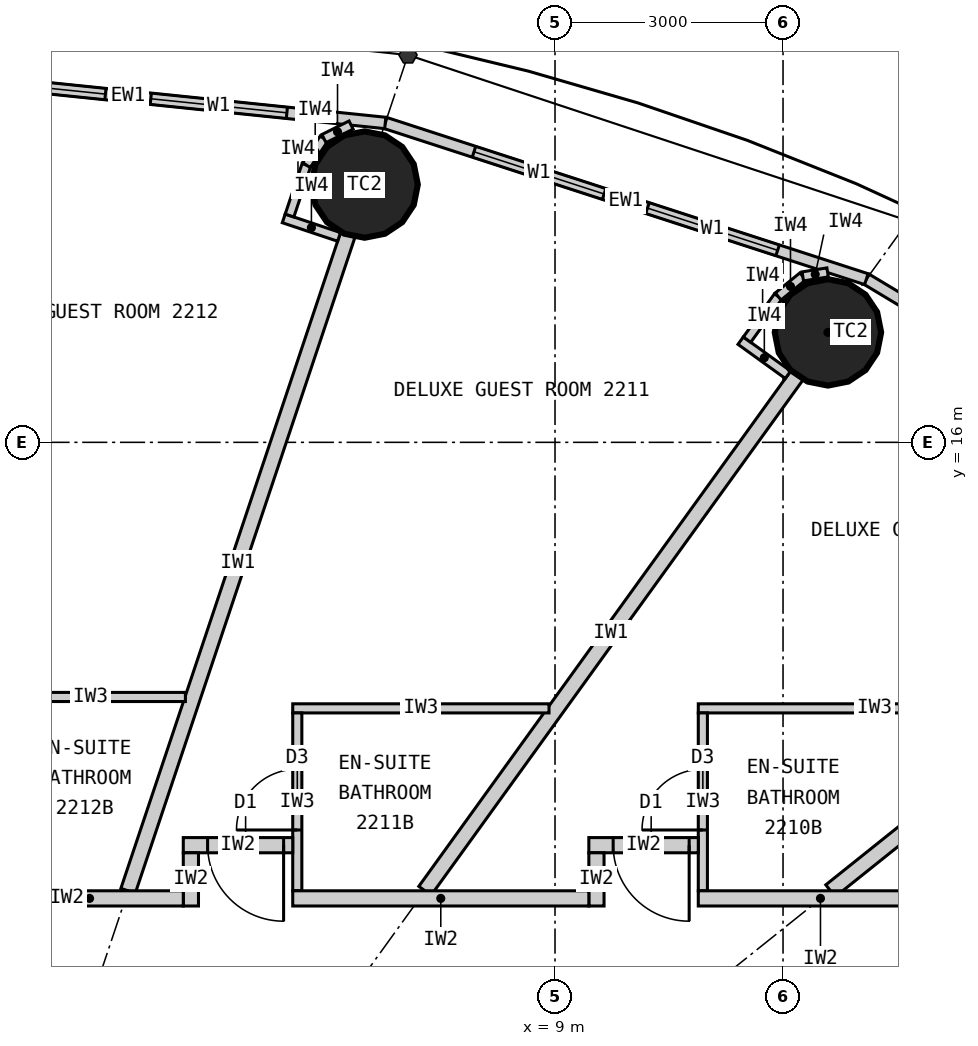
"""IFC4 building model, lengths in metres.
Left out: names, types, materials, properties, quantities, classifications, styles, units other than length and angle.
Written with IfcOpenShell. Run it as: python <this file> out.ifc"""

import sys

from ifc_helpers import new_model, si_unit, direction, frame, frame_2d, origin, origin_2d, place, context, subcontext, project, spatial, rectangle, circle, extrude, element, fill, save


model = new_model("IFC4")
c1 = context("Model", 3, precision=1e-05, world=origin(), true_north=direction((0.0, 1.0)))
c2 = subcontext(c1, "Body", "Model", "MODEL_VIEW")
j1 = project(units=[si_unit("LENGTHUNIT", "METRE"), si_unit("PLANEANGLEUNIT", "RADIAN")], contexts=[c1])
p1 = place(None, origin())
s1 = spatial("IfcSite", under=j1, at=p1, CompositionType="ELEMENT")
p2 = place(p1, origin())
s2 = spatial("IfcBuilding", under=s1, at=p2, CompositionType="ELEMENT")
p3 = place(p2, frame((0.0, 0.0, 87.0)))
s3 = spatial("IfcBuildingStorey", under=s2, at=p3, CompositionType="ELEMENT", Elevation=87.0)
for number, where, z_axis, x_axis in (
    (1, (12.591, 17.447, 0.0), (0.0, 0.0, 1.0), (1.0, 0.0, 0.0)),
    (2, (6.495, 19.391, 0.0), (0.0, 0.0, 1.0), (1.0, 0.0, 0.0)),
):
    element("IfcColumn", number, at=place(p3, frame(where, z_axis=z_axis, x_axis=x_axis)), inside=s3, PredefinedType="COLUMN", context=c2, shape_type="SweptSolid", body=[
        extrude(circle(Radius=0.7, at=origin_2d()), origin(), (0.0, 0.0, 1.0), 3.3),
    ])
p4 = place(p3, frame((18.57, 14.856, 0.0), z_axis=(0.0, 0.0, 1.0), x_axis=(-0.856983180864, 0.515344377787, 0.0)))
e3 = element("IfcWall", 3, at=p4, inside=s3, PredefinedType="ELEMENTEDWALL", context=c2, shape_type="SweptSolid", body=[
    extrude(rectangle(XDim=6.386, YDim=0.15, at=frame_2d((3.193, 0.0))), origin(), (0.0, 0.0, 1.0), 3.12),
])
p5 = place(p4, frame((1.093, 0.0, 0.9)))
e4 = element("IfcOpeningElement", 4, at=p5, cuts=e3, PredefinedType="OPENING", context=c2, shape_type="SweptSolid", body=[
    extrude(rectangle(XDim=1.8, YDim=1.9, at=frame_2d((0.9, 0.95))), frame((0.0, 0.085, 0.0), z_axis=(0.0, -1.0, 0.0), x_axis=(1.0, 0.0, 0.0)), (0.0, 0.0, 1.0), 0.17),
])
p6 = place(p4, frame((3.493, 0.0, 0.9)))
e5 = element("IfcOpeningElement", 5, at=p6, cuts=e3, PredefinedType="OPENING", context=c2, shape_type="SweptSolid", body=[
    extrude(rectangle(XDim=1.8, YDim=1.9, at=frame_2d((0.9, 0.95))), frame((0.0, 0.085, 0.0), z_axis=(0.0, -1.0, 0.0), x_axis=(1.0, 0.0, 0.0)), (0.0, 0.0, 1.0), 0.17),
])
p7 = place(p3, frame((13.096, 18.147, 0.0), z_axis=(0.0, 0.0, 1.0), x_axis=(-0.951137534625, 0.308767534285, 0.0)))
e6 = element("IfcWall", 6, at=p7, inside=s3, PredefinedType="ELEMENTEDWALL", context=c2, shape_type="SweptSolid", body=[
    extrude(rectangle(XDim=6.655, YDim=0.15, at=frame_2d((3.328, 0.0))), origin(), (0.0, 0.0, 1.0), 3.12),
])
p8 = place(p7, frame((1.228, 0.0, 0.9)))
e7 = element("IfcOpeningElement", 7, at=p8, cuts=e6, PredefinedType="OPENING", context=c2, shape_type="SweptSolid", body=[
    extrude(rectangle(XDim=1.8, YDim=1.9, at=frame_2d((0.9, 0.95))), frame((0.0, 0.085, 0.0), z_axis=(0.0, -1.0, 0.0), x_axis=(1.0, 0.0, 0.0)), (0.0, 0.0, 1.0), 0.17),
])
p9 = place(p7, frame((3.628, 0.0, 0.9)))
e8 = element("IfcOpeningElement", 8, at=p9, cuts=e6, PredefinedType="OPENING", context=c2, shape_type="SweptSolid", body=[
    extrude(rectangle(XDim=1.8, YDim=1.9, at=frame_2d((0.9, 0.95))), frame((0.0, 0.085, 0.0), z_axis=(0.0, -1.0, 0.0), x_axis=(1.0, 0.0, 0.0)), (0.0, 0.0, 1.0), 0.17),
])
p10 = place(p3, frame((6.766, 20.202, 0.0), z_axis=(0.0, 0.0, 1.0), x_axis=(-0.994721394369, 0.102612609291, 0.0)))
e9 = element("IfcWall", 9, at=p10, inside=s3, PredefinedType="ELEMENTEDWALL", context=c2, shape_type="SweptSolid", body=[
    extrude(rectangle(XDim=6.802, YDim=0.15, at=frame_2d((3.401, 0.0))), origin(), (0.0, 0.0, 1.0), 3.12),
])
p11 = place(p10, frame((1.301, 0.0, 0.9)))
e10 = element("IfcOpeningElement", 10, at=p11, cuts=e9, PredefinedType="OPENING", context=c2, shape_type="SweptSolid", body=[
    extrude(rectangle(XDim=1.8, YDim=1.9, at=frame_2d((0.9, 0.95))), frame((0.0, 0.085, 0.0), z_axis=(0.0, -1.0, 0.0), x_axis=(1.0, 0.0, 0.0)), (0.0, 0.0, 1.0), 0.17),
])
p12 = place(p10, frame((3.701, 0.0, 0.9)))
e11 = element("IfcOpeningElement", 11, at=p12, cuts=e9, PredefinedType="OPENING", context=c2, shape_type="SweptSolid", body=[
    extrude(rectangle(XDim=1.8, YDim=1.9, at=frame_2d((0.9, 0.95))), frame((0.0, 0.085, 0.0), z_axis=(0.0, -1.0, 0.0), x_axis=(1.0, 0.0, 0.0)), (0.0, 0.0, 1.0), 0.17),
])
p13 = place(p3, frame((12.625, 10.1, 0.0), z_axis=(0.0, 0.0, 1.0), x_axis=(0.780892451574, 0.624665493744, 0.0)))
e12 = element("IfcWall", 12, at=p13, inside=s3, PredefinedType="PARTITIONING", context=c2, shape_type="SweptSolid", body=[
    extrude(rectangle(XDim=6.045, YDim=0.2, at=frame_2d((3.022, 0.0))), origin(), (0.0, 0.0, 1.0), 2.27),
])
p14 = place(p3, frame((7.289, 10.1, 0.0), z_axis=(0.0, 0.0, 1.0), x_axis=(0.585198353053, 0.810890182197, 0.0)))
e13 = element("IfcWall", 13, at=p14, inside=s3, PredefinedType="PARTITIONING", context=c2, shape_type="SweptSolid", body=[
    extrude(rectangle(XDim=8.36, YDim=0.2, at=frame_2d((4.18, 0.0))), origin(), (0.0, 0.0, 1.0), 2.27),
])
p15 = place(p3, frame((3.383, 10.1, 0.0), z_axis=(0.0, 0.0, 1.0), x_axis=(0.31759592231, 0.948226149256, 0.0)))
e14 = element("IfcWall", 14, at=p15, inside=s3, PredefinedType="PARTITIONING", context=c2, shape_type="SweptSolid", body=[
    extrude(rectangle(XDim=9.098, YDim=0.2, at=frame_2d((4.549, 0.0))), origin(), (0.0, 0.0, 1.0), 2.27),
])
p16 = place(p3, frame((15.525, 12.5, 0.0), z_axis=(0.0, 0.0, 1.0), x_axis=(-1.0, 0.0, 0.0)))
e15 = element("IfcWall", 15, at=p16, inside=s3, PredefinedType="PARTITIONING", context=c2, shape_type="SweptSolid", body=[
    extrude(rectangle(XDim=4.64, YDim=0.12, at=frame_2d((2.32, 0.0))), origin(), (0.0, 0.0, 1.0), 3.12),
])
p17 = place(p3, frame((10.945, 10.1, 0.0), z_axis=(0.0, 0.0, 1.0), x_axis=(0.0, 1.0, 0.0)))
e16 = element("IfcWall", 16, at=p17, inside=s3, PredefinedType="PARTITIONING", context=c2, shape_type="SweptSolid", body=[
    extrude(rectangle(XDim=2.34, YDim=0.12, at=frame_2d((1.17, 0.0))), origin(), (0.0, 0.0, 1.0), 3.12),
])
p18 = place(p17, frame((0.8, 0.0, 0.0)))
e17 = element("IfcOpeningElement", 17, at=p18, cuts=e16, PredefinedType="OPENING", context=c2, shape_type="SweptSolid", body=[
    extrude(rectangle(XDim=0.8, YDim=2.1, at=frame_2d((0.4, 1.05))), frame((0.0, 0.07, 0.0), z_axis=(0.0, -1.0, 0.0), x_axis=(1.0, 0.0, 0.0)), (0.0, 0.0, 1.0), 0.14),
])
p19 = place(p3, frame((8.921, 12.5, 0.0), z_axis=(0.0, 0.0, 1.0), x_axis=(-1.0, 0.0, 0.0)))
e18 = element("IfcWall", 18, at=p19, inside=s3, PredefinedType="PARTITIONING", context=c2, shape_type="SweptSolid", body=[
    extrude(rectangle(XDim=3.372, YDim=0.12, at=frame_2d((1.686, 0.0))), origin(), (0.0, 0.0, 1.0), 3.12),
])
p20 = place(p3, frame((5.609, 10.1, 0.0), z_axis=(0.0, 0.0, 1.0), x_axis=(0.0, 1.0, 0.0)))
e19 = element("IfcWall", 19, at=p20, inside=s3, PredefinedType="PARTITIONING", context=c2, shape_type="SweptSolid", body=[
    extrude(rectangle(XDim=2.34, YDim=0.12, at=frame_2d((1.17, 0.0))), origin(), (0.0, 0.0, 1.0), 3.12),
])
p21 = place(p20, frame((0.8, 0.0, 0.0)))
e20 = element("IfcOpeningElement", 20, at=p21, cuts=e19, PredefinedType="OPENING", context=c2, shape_type="SweptSolid", body=[
    extrude(rectangle(XDim=0.8, YDim=2.1, at=frame_2d((0.4, 1.05))), frame((0.0, 0.07, 0.0), z_axis=(0.0, -1.0, 0.0), x_axis=(1.0, 0.0, 0.0)), (0.0, 0.0, 1.0), 0.14),
])
p22 = place(p3, frame((4.137, 12.65, 0.0), z_axis=(0.0, 0.0, 1.0), x_axis=(-1.0, 0.0, 0.0)))
e21 = element("IfcWall", 21, at=p22, inside=s3, PredefinedType="PARTITIONING", context=c2, shape_type="SweptSolid", body=[
    extrude(rectangle(XDim=2.494, YDim=0.12, at=frame_2d((1.247, 0.0))), origin(), (0.0, 0.0, 1.0), 3.12),
])
p23 = place(p3, frame((9.445, 10.7, 0.0), z_axis=(0.0, 0.0, 1.0), x_axis=(1.0, 0.0, 0.0)))
e22 = element("IfcWall", 22, at=p23, inside=s3, PredefinedType="PARTITIONING", context=c2, shape_type="SweptSolid", body=[
    extrude(rectangle(XDim=1.44, YDim=0.2, at=frame_2d((0.72, 0.0))), origin(), (0.0, 0.0, 1.0), 3.12),
])
p24 = place(p23, frame((0.32, 0.0, 0.0)))
e23 = element("IfcOpeningElement", 23, at=p24, cuts=e22, PredefinedType="OPENING", context=c2, shape_type="SweptSolid", body=[
    extrude(rectangle(XDim=1.0, YDim=2.2, at=frame_2d((0.5, 1.1))), frame((0.0, 0.11, 0.0), z_axis=(0.0, -1.0, 0.0), x_axis=(1.0, 0.0, 0.0)), (0.0, 0.0, 1.0), 0.22),
])
p25 = place(p3, frame((9.545, 9.9, 0.0), z_axis=(0.0, 0.0, 1.0), x_axis=(0.0, 1.0, 0.0)))
e24 = element("IfcWall", 24, at=p25, inside=s3, PredefinedType="PARTITIONING", context=c2, shape_type="SweptSolid", body=[
    extrude(rectangle(XDim=0.7, YDim=0.2, at=frame_2d((0.35, 0.0))), origin(), (0.0, 0.0, 1.0), 3.12),
])
p26 = place(p3, frame((4.109, 10.7, 0.0), z_axis=(0.0, 0.0, 1.0), x_axis=(1.0, 0.0, 0.0)))
e25 = element("IfcWall", 25, at=p26, inside=s3, PredefinedType="PARTITIONING", context=c2, shape_type="SweptSolid", body=[
    extrude(rectangle(XDim=1.44, YDim=0.2, at=frame_2d((0.72, 0.0))), origin(), (0.0, 0.0, 1.0), 3.12),
])
p27 = place(p26, frame((0.32, 0.0, 0.0)))
e26 = element("IfcOpeningElement", 26, at=p27, cuts=e25, PredefinedType="OPENING", context=c2, shape_type="SweptSolid", body=[
    extrude(rectangle(XDim=1.0, YDim=2.2, at=frame_2d((0.5, 1.1))), frame((0.0, 0.11, 0.0), z_axis=(0.0, -1.0, 0.0), x_axis=(1.0, 0.0, 0.0)), (0.0, 0.0, 1.0), 0.22),
])
p28 = place(p3, frame((4.209, 9.9, 0.0), z_axis=(0.0, 0.0, 1.0), x_axis=(0.0, 1.0, 0.0)))
e27 = element("IfcWall", 27, at=p28, inside=s3, PredefinedType="PARTITIONING", context=c2, shape_type="SweptSolid", body=[
    extrude(rectangle(XDim=0.7, YDim=0.2, at=frame_2d((0.35, 0.0))), origin(), (0.0, 0.0, 1.0), 3.12),
])
p29 = place(p3, frame((1.643, 10.0, 0.0), z_axis=(0.0, 0.0, 1.0), x_axis=(1.0, 0.0, 0.0)))
e28 = element("IfcWall", 28, at=p29, inside=s3, PredefinedType="PARTITIONING", context=c2, shape_type="SweptSolid", body=[
    extrude(rectangle(XDim=2.466, YDim=0.2, at=frame_2d((1.233, 0.0))), origin(), (0.0, 0.0, 1.0), 3.12),
])
p30 = place(p3, frame((5.549, 10.0, 0.0), z_axis=(0.0, 0.0, 1.0), x_axis=(1.0, 0.0, 0.0)))
e29 = element("IfcWall", 29, at=p30, inside=s3, PredefinedType="PARTITIONING", context=c2, shape_type="SweptSolid", body=[
    extrude(rectangle(XDim=3.896, YDim=0.2, at=frame_2d((1.948, 0.0))), origin(), (0.0, 0.0, 1.0), 3.12),
])
p31 = place(p3, frame((10.885, 10.0, 0.0), z_axis=(0.0, 0.0, 1.0), x_axis=(1.0, 0.0, 0.0)))
e30 = element("IfcWall", 30, at=p31, inside=s3, PredefinedType="PARTITIONING", context=c2, shape_type="SweptSolid", body=[
    extrude(rectangle(XDim=3.215, YDim=0.2, at=frame_2d((1.607, 0.0))), origin(), (0.0, 0.0, 1.0), 3.12),
])
p32 = place(p3, frame((12.065, 16.889, 0.0), z_axis=(0.0, 0.0, 1.0), x_axis=(-0.810821798253, 0.585293098778, 0.0)))
e31 = element("IfcWall", 31, at=p32, inside=s3, PredefinedType="PARTITIONING", context=c2, shape_type="SweptSolid", body=[
    extrude(rectangle(XDim=0.768, YDim=0.12, at=frame_2d((0.384, 0.0))), origin(), (0.0, 0.0, 1.0), 3.12),
])
p33 = place(p3, frame((11.526, 17.351, 0.0), z_axis=(0.0, 0.0, 1.0), x_axis=(0.585223113993, 0.810872312296, 0.0)))
e32 = element("IfcWall", 32, at=p33, inside=s3, PredefinedType="PARTITIONING", context=c2, shape_type="SweptSolid", body=[
    extrude(rectangle(XDim=0.7, YDim=0.12, at=frame_2d((0.35, 0.0))), origin(), (0.0, 0.0, 1.0), 3.12),
])
p34 = place(p3, frame((11.936, 17.919, 0.0), z_axis=(0.0, 0.0, 1.0), x_axis=(0.775023088441, 0.631932917629, 0.0)))
e33 = element("IfcWall", 33, at=p34, inside=s3, PredefinedType="PARTITIONING", context=c2, shape_type="SweptSolid", body=[
    extrude(rectangle(XDim=0.418, YDim=0.12, at=frame_2d((0.209, 0.0))), origin(), (0.0, 0.0, 1.0), 3.12),
])
p35 = place(p3, frame((12.26, 18.183, 0.0), z_axis=(0.0, 0.0, 1.0), x_axis=(0.987218661664, 0.159371622511, 0.0)))
e34 = element("IfcWall", 34, at=p35, inside=s3, PredefinedType="PARTITIONING", context=c2, shape_type="SweptSolid", body=[
    extrude(rectangle(XDim=0.331, YDim=0.12, at=frame_2d((0.166, 0.0))), origin(), (0.0, 0.0, 1.0), 3.12),
])
p36 = place(p3, frame((6.159, 18.702, 0.0), z_axis=(0.0, 0.0, 1.0), x_axis=(-0.948173154049, 0.31775410295, 0.0)))
e35 = element("IfcWall", 35, at=p36, inside=s3, PredefinedType="PARTITIONING", context=c2, shape_type="SweptSolid", body=[
    extrude(rectangle(XDim=0.768, YDim=0.12, at=frame_2d((0.384, 0.0))), origin(), (0.0, 0.0, 1.0), 3.12),
])
p37 = place(p3, frame((5.507, 18.984, 0.0), z_axis=(0.0, 0.0, 1.0), x_axis=(0.317692050622, 0.948193946918, 0.0)))
e36 = element("IfcWall", 36, at=p37, inside=s3, PredefinedType="PARTITIONING", context=c2, shape_type="SweptSolid", body=[
    extrude(rectangle(XDim=0.7, YDim=0.12, at=frame_2d((0.35, 0.0))), origin(), (0.0, 0.0, 1.0), 3.12),
])
p38 = place(p3, frame((5.729, 19.648, 0.0), z_axis=(0.0, 0.0, 1.0), x_axis=(0.552135764955, 0.833754218615, 0.0)))
e37 = element("IfcWall", 37, at=p38, inside=s3, PredefinedType="PARTITIONING", context=c2, shape_type="SweptSolid", body=[
    extrude(rectangle(XDim=0.418, YDim=0.12, at=frame_2d((0.209, 0.0))), origin(), (0.0, 0.0, 1.0), 3.12),
])
p39 = place(p3, frame((5.96, 19.996, 0.0), z_axis=(0.0, 0.0, 1.0), x_axis=(0.895160725913, 0.445743507842, 0.0)))
e38 = element("IfcWall", 38, at=p39, inside=s3, PredefinedType="PARTITIONING", context=c2, shape_type="SweptSolid", body=[
    extrude(rectangle(XDim=0.399, YDim=0.12, at=frame_2d((0.199, 0.0))), origin(), (0.0, 0.0, 1.0), 3.12),
])
p40 = place(p8, origin())
e39 = element("IfcWindow", 39, at=p40, inside=s3, PartitioningType="SINGLE_PANEL", PredefinedType="WINDOW", context=c2, shape_type="SweptSolid", body=[
    extrude(rectangle(XDim=1.8, YDim=1.9, at=frame_2d((0.9, 0.95))), frame((0.0, 0.03, 0.0), z_axis=(0.0, -1.0, 0.0), x_axis=(1.0, 0.0, 0.0)), (0.0, 0.0, 1.0), 0.06),
])
fill(e7, e39)
p41 = place(p9, origin())
e40 = element("IfcWindow", 40, at=p41, inside=s3, PartitioningType="SINGLE_PANEL", PredefinedType="WINDOW", context=c2, shape_type="SweptSolid", body=[
    extrude(rectangle(XDim=1.8, YDim=1.9, at=frame_2d((0.9, 0.95))), frame((0.0, 0.03, 0.0), z_axis=(0.0, -1.0, 0.0), x_axis=(1.0, 0.0, 0.0)), (0.0, 0.0, 1.0), 0.06),
])
fill(e8, e40)
p42 = place(p11, origin())
e41 = element("IfcWindow", 41, at=p42, inside=s3, PartitioningType="SINGLE_PANEL", PredefinedType="WINDOW", context=c2, shape_type="SweptSolid", body=[
    extrude(rectangle(XDim=1.8, YDim=1.9, at=frame_2d((0.9, 0.95))), frame((0.0, 0.03, 0.0), z_axis=(0.0, -1.0, 0.0), x_axis=(1.0, 0.0, 0.0)), (0.0, 0.0, 1.0), 0.06),
])
fill(e10, e41)
p43 = place(p12, origin())
e42 = element("IfcWindow", 42, at=p43, inside=s3, PartitioningType="SINGLE_PANEL", PredefinedType="WINDOW", context=c2, shape_type="SweptSolid", body=[
    extrude(rectangle(XDim=1.8, YDim=1.9, at=frame_2d((0.9, 0.95))), frame((0.0, 0.03, 0.0), z_axis=(0.0, -1.0, 0.0), x_axis=(1.0, 0.0, 0.0)), (0.0, 0.0, 1.0), 0.06),
])
fill(e11, e42)
p44 = place(p18, origin())
e43 = element("IfcDoor", 43, at=p44, inside=s3, OperationType="SINGLE_SWING_LEFT", PredefinedType="DOOR", context=c2, shape_type="SweptSolid", body=[
    extrude(rectangle(XDim=0.8, YDim=2.1, at=frame_2d((0.4, 1.05))), frame((0.0, 0.025, 0.0), z_axis=(0.0, -1.0, 0.0), x_axis=(1.0, 0.0, 0.0)), (0.0, 0.0, 1.0), 0.05),
])
fill(e17, e43)
p45 = place(p24, origin())
e44 = element("IfcDoor", 44, at=p45, inside=s3, OperationType="SINGLE_SWING_RIGHT", PredefinedType="DOOR", context=c2, shape_type="SweptSolid", body=[
    extrude(rectangle(XDim=1.0, YDim=2.2, at=frame_2d((0.5, 1.1))), frame((0.0, 0.025, 0.0), z_axis=(0.0, -1.0, 0.0), x_axis=(1.0, 0.0, 0.0)), (0.0, 0.0, 1.0), 0.05),
])
fill(e23, e44)
p46 = place(p21, origin())
e45 = element("IfcDoor", 45, at=p46, inside=s3, OperationType="SINGLE_SWING_LEFT", PredefinedType="DOOR", context=c2, shape_type="SweptSolid", body=[
    extrude(rectangle(XDim=0.8, YDim=2.1, at=frame_2d((0.4, 1.05))), frame((0.0, 0.025, 0.0), z_axis=(0.0, -1.0, 0.0), x_axis=(1.0, 0.0, 0.0)), (0.0, 0.0, 1.0), 0.05),
])
fill(e20, e45)
p47 = place(p27, origin())
e46 = element("IfcDoor", 46, at=p47, inside=s3, OperationType="SINGLE_SWING_RIGHT", PredefinedType="DOOR", context=c2, shape_type="SweptSolid", body=[
    extrude(rectangle(XDim=1.0, YDim=2.2, at=frame_2d((0.5, 1.1))), frame((0.0, 0.025, 0.0), z_axis=(0.0, -1.0, 0.0), x_axis=(1.0, 0.0, 0.0)), (0.0, 0.0, 1.0), 0.05),
])
fill(e26, e46)
save(model, sys.argv[1])
